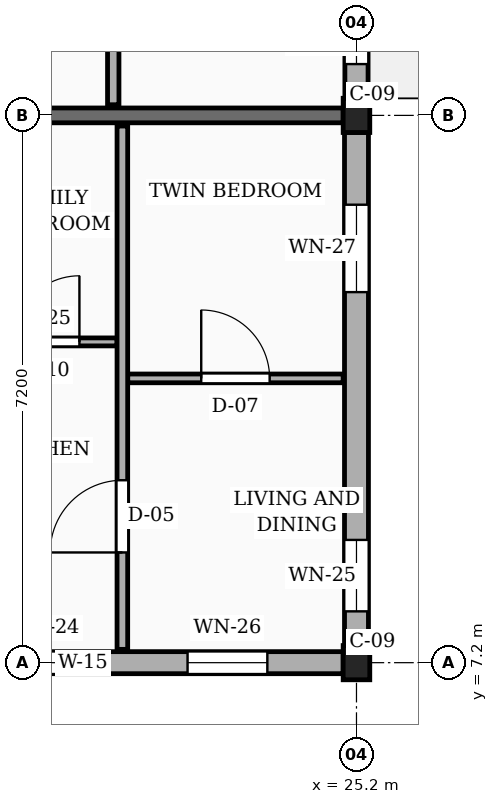
"""IFC4 building model, lengths in metres.
Left out: names, types, materials, properties, quantities, classifications, styles, units other than length and angle.
Written with IfcOpenShell. Run it as: python <this file> out.ifc"""

import sys

from ifc_helpers import new_model, si_unit, direction, frame, frame_2d, origin, origin_2d, place, context, subcontext, project, spatial, rectangle, extrude, element, fill, save


model = new_model("IFC4")
c1 = context("Model", 3, precision=1e-05, world=origin(), true_north=direction((0.0, 1.0)))
c2 = subcontext(c1, "Body", "Model", "MODEL_VIEW")
j1 = project(units=[si_unit("LENGTHUNIT", "METRE"), si_unit("PLANEANGLEUNIT", "RADIAN")], contexts=[c1])
p1 = place(None, origin())
s1 = spatial("IfcSite", under=j1, at=p1, CompositionType="ELEMENT")
p2 = place(p1, origin())
s2 = spatial("IfcBuilding", under=s1, at=p2, CompositionType="ELEMENT")
p3 = place(p2, frame((0.0, 0.0, 48.6)))
s3 = spatial("IfcBuildingStorey", under=s2, at=p3, CompositionType="ELEMENT", Elevation=48.6)
for number, where, z_axis, x_axis in (
    (1, (25.2, 7.2, 0.0), (0.0, 0.0, 1.0), (1.0, 0.0, 0.0)),
    (2, (25.2, 14.4, 0.0), (0.0, 0.0, 1.0), (1.0, 0.0, 0.0)),
):
    element("IfcColumn", number, at=place(p3, frame(where, z_axis=z_axis, x_axis=x_axis)), inside=s3, PredefinedType="COLUMN", context=c2, shape_type="SweptSolid", body=[
        extrude(rectangle(XDim=0.35, YDim=0.45, at=origin_2d()), origin(), (0.0, 0.0, 1.0), 3.15),
    ])
p4 = place(p3, frame((20.1, 14.4, 0.0), z_axis=(0.0, 0.0, 1.0), x_axis=(1.0, 0.0, 0.0)))
e3 = element("IfcWall", 3, at=p4, inside=s3, PredefinedType="SOLIDWALL", context=c2, shape_type="SweptSolid", body=[
    extrude(rectangle(XDim=4.925, YDim=0.195, at=frame_2d((2.462, 0.0))), origin(), (0.0, 0.0, 1.0), 2.22),
])
p5 = place(p3, frame((18.175, 7.2, 0.0), z_axis=(0.0, 0.0, 1.0), x_axis=(1.0, 0.0, 0.0)))
e4 = element("IfcWall", 4, at=p5, inside=s3, PredefinedType="SOLIDWALL", context=c2, shape_type="SweptSolid", body=[
    extrude(rectangle(XDim=6.85, YDim=0.29, at=frame_2d((3.425, 0.0))), origin(), (0.0, 0.0, 1.0), 2.46),
])
p6 = place(p5, frame((0.433, 0.0, 0.78)))
e5 = element("IfcOpeningElement", 5, at=p6, cuts=e4, PredefinedType="OPENING", context=c2, shape_type="SweptSolid", body=[
    extrude(rectangle(XDim=1.2, YDim=1.26, at=frame_2d((0.6, 0.63))), frame((0.0, 0.155, 0.0), z_axis=(0.0, -1.0, 0.0), x_axis=(1.0, 0.0, 0.0)), (0.0, 0.0, 1.0), 0.31),
])
p7 = place(p5, frame((2.205, 0.0, 0.78)))
e6 = element("IfcOpeningElement", 6, at=p7, cuts=e4, PredefinedType="OPENING", context=c2, shape_type="SweptSolid", body=[
    extrude(rectangle(XDim=1.46, YDim=1.36, at=frame_2d((0.73, 0.68))), frame((0.0, 0.155, 0.0), z_axis=(0.0, -1.0, 0.0), x_axis=(1.0, 0.0, 0.0)), (0.0, 0.0, 1.0), 0.31),
])
p8 = place(p5, frame((4.802, 0.0, 0.78)))
e7 = element("IfcOpeningElement", 7, at=p8, cuts=e4, PredefinedType="OPENING", context=c2, shape_type="SweptSolid", body=[
    extrude(rectangle(XDim=1.05, YDim=1.44, at=frame_2d((0.525, 0.72))), frame((0.0, 0.155, 0.0), z_axis=(0.0, -1.0, 0.0), x_axis=(1.0, 0.0, 0.0)), (0.0, 0.0, 1.0), 0.31),
])
p9 = place(p3, frame((25.2, 7.425, 0.0), z_axis=(0.0, 0.0, 1.0), x_axis=(0.0, 1.0, 0.0)))
e8 = element("IfcWall", 8, at=p9, inside=s3, PredefinedType="SOLIDWALL", context=c2, shape_type="SweptSolid", body=[
    extrude(rectangle(XDim=6.75, YDim=0.315, at=frame_2d((3.375, 0.0))), origin(), (0.0, 0.0, 1.0), 2.46),
])
p10 = place(p9, frame((0.45, 0.0, 0.78)))
e9 = element("IfcOpeningElement", 9, at=p10, cuts=e8, PredefinedType="OPENING", context=c2, shape_type="SweptSolid", body=[
    extrude(rectangle(XDim=0.94, YDim=1.44, at=frame_2d((0.47, 0.72))), frame((0.0, 0.167, 0.0), z_axis=(0.0, -1.0, 0.0), x_axis=(1.0, 0.0, 0.0)), (0.0, 0.0, 1.0), 0.335),
])
p11 = place(p9, frame((4.65, 0.0, 0.78)))
e10 = element("IfcOpeningElement", 10, at=p11, cuts=e8, PredefinedType="OPENING", context=c2, shape_type="SweptSolid", body=[
    extrude(rectangle(XDim=1.15, YDim=1.44, at=frame_2d((0.575, 0.72))), frame((0.0, 0.167, 0.0), z_axis=(0.0, -1.0, 0.0), x_axis=(1.0, 0.0, 0.0)), (0.0, 0.0, 1.0), 0.335),
])
p12 = place(p3, frame((25.2, 14.625, 0.0), z_axis=(0.0, 0.0, 1.0), x_axis=(0.0, 1.0, 0.0)))
e11 = element("IfcWall", 11, at=p12, inside=s3, PredefinedType="SOLIDWALL", context=c2, shape_type="SweptSolid", body=[
    extrude(rectangle(XDim=6.75, YDim=0.305, at=frame_2d((3.375, 0.0))), origin(), (0.0, 0.0, 1.0), 2.46),
])
p13 = place(p12, frame((0.45, 0.0, 0.78)))
e12 = element("IfcOpeningElement", 12, at=p13, cuts=e11, PredefinedType="OPENING", context=c2, shape_type="SweptSolid", body=[
    extrude(rectangle(XDim=1.15, YDim=1.44, at=frame_2d((0.575, 0.72))), frame((0.0, 0.163, 0.0), z_axis=(0.0, -1.0, 0.0), x_axis=(1.0, 0.0, 0.0)), (0.0, 0.0, 1.0), 0.325),
])
p14 = place(p12, frame((4.65, 0.0, 0.78)))
e13 = element("IfcOpeningElement", 13, at=p14, cuts=e11, PredefinedType="OPENING", context=c2, shape_type="SweptSolid", body=[
    extrude(rectangle(XDim=1.35, YDim=1.44, at=frame_2d((0.675, 0.72))), frame((0.0, 0.163, 0.0), z_axis=(0.0, -1.0, 0.0), x_axis=(1.0, 0.0, 0.0)), (0.0, 0.0, 1.0), 0.325),
])
p15 = place(p3, frame((22.19, 10.94, 0.0), z_axis=(0.0, 0.0, 1.0), x_axis=(1.0, 0.0, 0.0)))
e14 = element("IfcWall", 14, at=p15, inside=s3, PredefinedType="PARTITIONING", context=c2, shape_type="SweptSolid", body=[
    extrude(rectangle(XDim=2.835, YDim=0.115, at=frame_2d((1.417, 0.0))), origin(), (0.0, 0.0, 1.0), 2.325),
])
p16 = place(p15, frame((0.968, 0.0, 0.0)))
e15 = element("IfcOpeningElement", 15, at=p16, cuts=e14, PredefinedType="OPENING", context=c2, shape_type="SweptSolid", body=[
    extrude(rectangle(XDim=0.9, YDim=2.1, at=frame_2d((0.45, 1.05))), frame((0.0, 0.067, 0.0), z_axis=(0.0, -1.0, 0.0), x_axis=(1.0, 0.0, 0.0)), (0.0, 0.0, 1.0), 0.135),
])
p17 = place(p3, frame((20.19, 11.42, 0.0), z_axis=(0.0, 0.0, 1.0), x_axis=(1.0, 0.0, 0.0)))
e16 = element("IfcWall", 16, at=p17, inside=s3, PredefinedType="PARTITIONING", context=c2, shape_type="SweptSolid", body=[
    extrude(rectangle(XDim=1.86, YDim=0.105, at=frame_2d((0.93, 0.0))), origin(), (0.0, 0.0, 1.0), 2.325),
])
p18 = place(p17, frame((0.495, 0.0, 0.0)))
e17 = element("IfcOpeningElement", 17, at=p18, cuts=e16, PredefinedType="OPENING", context=c2, shape_type="SweptSolid", body=[
    extrude(rectangle(XDim=0.87, YDim=2.05, at=frame_2d((0.435, 1.025))), frame((0.0, 0.062, 0.0), z_axis=(0.0, -1.0, 0.0), x_axis=(1.0, 0.0, 0.0)), (0.0, 0.0, 1.0), 0.125),
])
p19 = place(p3, frame((22.12, 7.375, 0.0), z_axis=(0.0, 0.0, 1.0), x_axis=(0.0, 1.0, 0.0)))
e18 = element("IfcWall", 18, at=p19, inside=s3, PredefinedType="PARTITIONING", context=c2, shape_type="SweptSolid", body=[
    extrude(rectangle(XDim=6.885, YDim=0.14, at=frame_2d((3.442, 0.0))), origin(), (0.0, 0.0, 1.0), 2.325),
])
p20 = place(p19, frame((1.275, 0.0, 0.0)))
e19 = element("IfcOpeningElement", 19, at=p20, cuts=e18, PredefinedType="OPENING", context=c2, shape_type="SweptSolid", body=[
    extrude(rectangle(XDim=0.95, YDim=2.1, at=frame_2d((0.475, 1.05))), frame((0.0, 0.08, 0.0), z_axis=(0.0, -1.0, 0.0), x_axis=(1.0, 0.0, 0.0)), (0.0, 0.0, 1.0), 0.16),
])
p21 = place(p3, frame((22.0, 14.54, 0.0), z_axis=(0.0, 0.0, 1.0), x_axis=(0.0, 1.0, 0.0)))
e20 = element("IfcWall", 20, at=p21, inside=s3, PredefinedType="PARTITIONING", context=c2, shape_type="SweptSolid", body=[
    extrude(rectangle(XDim=6.92, YDim=0.15, at=frame_2d((3.46, 0.0))), origin(), (0.0, 0.0, 1.0), 2.325),
])
p22 = place(p21, frame((4.66, 0.0, 0.0)))
e21 = element("IfcOpeningElement", 21, at=p22, cuts=e20, PredefinedType="OPENING", context=c2, shape_type="SweptSolid", body=[
    extrude(rectangle(XDim=0.92, YDim=2.1, at=frame_2d((0.46, 1.05))), frame((0.0, 0.085, 0.0), z_axis=(0.0, -1.0, 0.0), x_axis=(1.0, 0.0, 0.0)), (0.0, 0.0, 1.0), 0.17),
])
p23 = place(p7, origin())
e22 = element("IfcWindow", 22, at=p23, inside=s3, PartitioningType="SINGLE_PANEL", PredefinedType="WINDOW", context=c2, shape_type="SweptSolid", body=[
    extrude(rectangle(XDim=1.46, YDim=1.36, at=frame_2d((0.73, 0.68))), frame((0.0, 0.03, 0.0), z_axis=(0.0, -1.0, 0.0), x_axis=(1.0, 0.0, 0.0)), (0.0, 0.0, 1.0), 0.06),
])
fill(e6, e22)
p24 = place(p8, origin())
e23 = element("IfcWindow", 23, at=p24, inside=s3, PartitioningType="SINGLE_PANEL", PredefinedType="WINDOW", context=c2, shape_type="SweptSolid", body=[
    extrude(rectangle(XDim=1.05, YDim=1.44, at=frame_2d((0.525, 0.72))), frame((0.0, 0.03, 0.0), z_axis=(0.0, -1.0, 0.0), x_axis=(1.0, 0.0, 0.0)), (0.0, 0.0, 1.0), 0.06),
])
fill(e7, e23)
p25 = place(p10, origin())
e24 = element("IfcWindow", 24, at=p25, inside=s3, PartitioningType="SINGLE_PANEL", PredefinedType="WINDOW", context=c2, shape_type="SweptSolid", body=[
    extrude(rectangle(XDim=0.94, YDim=1.44, at=frame_2d((0.47, 0.72))), frame((0.0, 0.03, 0.0), z_axis=(0.0, -1.0, 0.0), x_axis=(1.0, 0.0, 0.0)), (0.0, 0.0, 1.0), 0.06),
])
fill(e9, e24)
p26 = place(p11, origin())
e25 = element("IfcWindow", 25, at=p26, inside=s3, PartitioningType="SINGLE_PANEL", PredefinedType="WINDOW", context=c2, shape_type="SweptSolid", body=[
    extrude(rectangle(XDim=1.15, YDim=1.44, at=frame_2d((0.575, 0.72))), frame((0.0, 0.03, 0.0), z_axis=(0.0, -1.0, 0.0), x_axis=(1.0, 0.0, 0.0)), (0.0, 0.0, 1.0), 0.06),
])
fill(e10, e25)
p27 = place(p13, origin())
e26 = element("IfcWindow", 26, at=p27, inside=s3, PartitioningType="SINGLE_PANEL", PredefinedType="WINDOW", context=c2, shape_type="SweptSolid", body=[
    extrude(rectangle(XDim=1.15, YDim=1.44, at=frame_2d((0.575, 0.72))), frame((0.0, 0.03, 0.0), z_axis=(0.0, -1.0, 0.0), x_axis=(1.0, 0.0, 0.0)), (0.0, 0.0, 1.0), 0.06),
])
fill(e12, e26)
p28 = place(p16, origin())
e27 = element("IfcDoor", 27, at=p28, inside=s3, OperationType="SINGLE_SWING_LEFT", PredefinedType="DOOR", context=c2, shape_type="SweptSolid", body=[
    extrude(rectangle(XDim=0.9, YDim=2.1, at=frame_2d((0.45, 1.05))), frame((0.0, 0.025, 0.0), z_axis=(0.0, -1.0, 0.0), x_axis=(1.0, 0.0, 0.0)), (0.0, 0.0, 1.0), 0.05),
])
fill(e15, e27)
p29 = place(p18, origin())
e28 = element("IfcDoor", 28, at=p29, inside=s3, OperationType="SINGLE_SWING_RIGHT", PredefinedType="DOOR", context=c2, shape_type="SweptSolid", body=[
    extrude(rectangle(XDim=0.87, YDim=2.05, at=frame_2d((0.435, 1.025))), frame((0.0, 0.025, 0.0), z_axis=(0.0, -1.0, 0.0), x_axis=(1.0, 0.0, 0.0)), (0.0, 0.0, 1.0), 0.05),
])
fill(e17, e28)
p30 = place(p20, origin())
e29 = element("IfcDoor", 29, at=p30, inside=s3, OperationType="SINGLE_SWING_LEFT", PredefinedType="DOOR", context=c2, shape_type="SweptSolid", body=[
    extrude(rectangle(XDim=0.95, YDim=2.1, at=frame_2d((0.475, 1.05))), frame((0.0, 0.025, 0.0), z_axis=(0.0, -1.0, 0.0), x_axis=(1.0, 0.0, 0.0)), (0.0, 0.0, 1.0), 0.05),
])
fill(e19, e29)
save(model, sys.argv[1])
